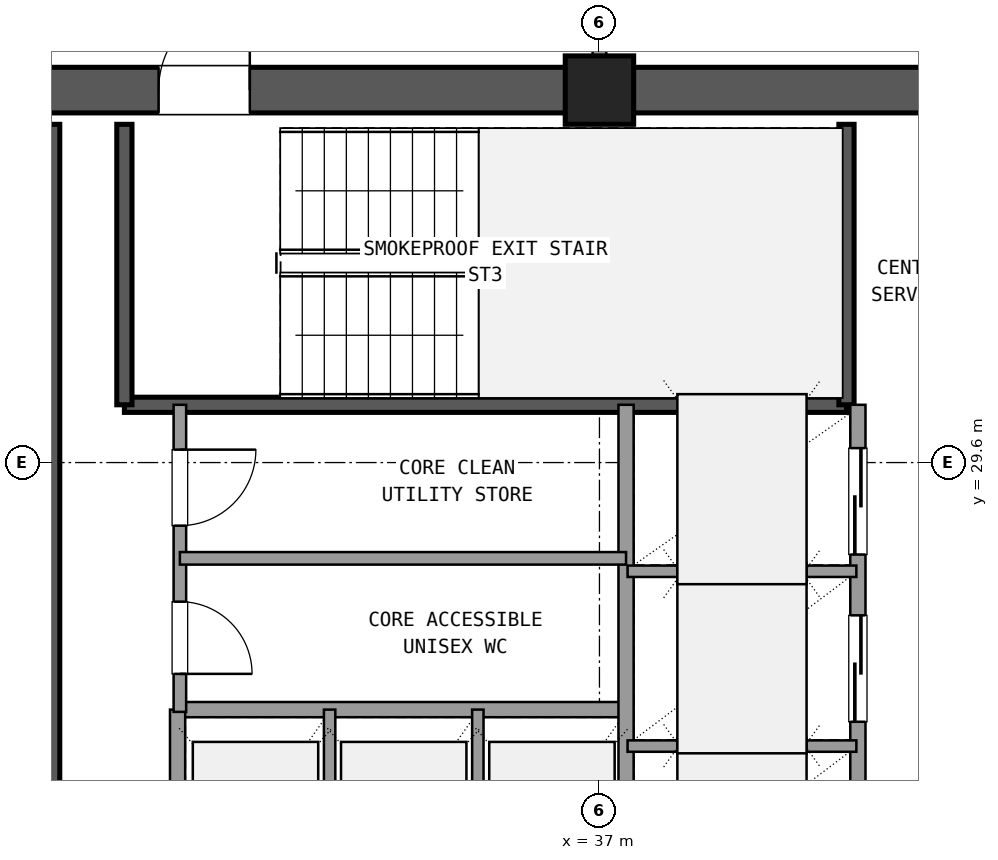
"""IFC4 building model, lengths in metres.
Left out: names, types, materials, properties, quantities, classifications, styles, units other than length and angle.
Written with IfcOpenShell. Run it as: python <this file> out.ifc"""

import sys

from ifc_helpers import new_model, si_unit, direction, frame, frame_2d, origin, origin_2d, place, context, subcontext, project, spatial, rectangle, extrude, element, fill, save


model = new_model("IFC4")
c1 = context("Model", 3, precision=1e-05, world=origin(), true_north=direction((0.0, 1.0)))
c2 = subcontext(c1, "Body", "Model", "MODEL_VIEW")
j1 = project(units=[si_unit("LENGTHUNIT", "METRE"), si_unit("PLANEANGLEUNIT", "RADIAN")], contexts=[c1])
p1 = place(None, origin())
s1 = spatial("IfcSite", under=j1, at=p1, CompositionType="ELEMENT")
p2 = place(p1, origin())
s2 = spatial("IfcBuilding", under=s1, at=p2, CompositionType="ELEMENT")
p3 = place(p2, frame((0.0, 0.0, 203.58)))
s3 = spatial("IfcBuildingStorey", under=s2, at=p3, CompositionType="ELEMENT", Elevation=203.58)
p4 = place(p3, frame((37.0, 34.5, 0.0), z_axis=(0.0, 0.0, 1.0), x_axis=(1.0, 0.0, 0.0)))
e1 = element("IfcColumn", 1, at=p4, inside=s3, PredefinedType="COLUMN", context=c2, shape_type="SweptSolid", body=[
    extrude(rectangle(XDim=0.9, YDim=0.9, at=origin_2d()), origin(), (0.0, 0.0, 1.0), 3.6),
])
p5 = place(p3, frame((47.755, 34.5, 0.0), z_axis=(0.0, 0.0, 1.0), x_axis=(-1.0, 0.0, 0.0)))
e2 = element("IfcWall", 2, at=p5, inside=s3, PredefinedType="SHEAR", context=c2, shape_type="SweptSolid", body=[
    extrude(rectangle(XDim=10.31, YDim=0.6, at=frame_2d((5.155, 0.0))), origin(), (0.0, 0.0, 1.0), 3.32),
])
p6 = place(p5, frame((4.655, 0.0, 0.0)))
e3 = element("IfcOpeningElement", 3, at=p6, cuts=e2, PredefinedType="OPENING", context=c2, shape_type="SweptSolid", body=[
    extrude(rectangle(XDim=1.6, YDim=2.2, at=frame_2d((0.8, 1.1))), frame((0.0, 0.31, 0.0), z_axis=(0.0, -1.0, 0.0), x_axis=(1.0, 0.0, 0.0)), (0.0, 0.0, 1.0), 0.62),
])
p7 = place(p3, frame((36.555, 34.5, 0.0), z_axis=(0.0, 0.0, 1.0), x_axis=(-1.0, 0.0, 0.0)))
e4 = element("IfcWall", 4, at=p7, inside=s3, PredefinedType="SHEAR", context=c2, shape_type="SweptSolid", body=[
    extrude(rectangle(XDim=10.31, YDim=0.6, at=frame_2d((5.155, 0.0))), origin(), (0.0, 0.0, 1.0), 3.32),
])
p8 = place(p7, frame((4.155, 0.0, 0.0)))
e5 = element("IfcOpeningElement", 5, at=p8, cuts=e4, PredefinedType="OPENING", context=c2, shape_type="SweptSolid", body=[
    extrude(rectangle(XDim=1.2, YDim=2.15, at=frame_2d((0.6, 1.075))), frame((0.0, 0.31, 0.0), z_axis=(0.0, -1.0, 0.0), x_axis=(1.0, 0.0, 0.0)), (0.0, 0.0, 1.0), 0.62),
])
p9 = place(p3, frame((29.8, 24.65, 0.0), z_axis=(0.0, 0.0, 1.0), x_axis=(0.0, 1.0, 0.0)))
e6 = element("IfcWall", 6, at=p9, inside=s3, PredefinedType="SHEAR", context=c2, shape_type="SweptSolid", body=[
    extrude(rectangle(XDim=9.4, YDim=0.2, at=frame_2d((4.7, 0.0))), origin(), (0.0, 0.0, 1.0), 3.32),
])
p10 = place(p3, frame((30.75, 30.36, 0.0), z_axis=(0.0, 0.0, 1.0), x_axis=(1.0, 0.0, 0.0)))
e7 = element("IfcWall", 7, at=p10, inside=s3, PredefinedType="SHEAR", context=c2, shape_type="SweptSolid", body=[
    extrude(rectangle(XDim=9.5, YDim=0.2, at=frame_2d((4.75, 0.0))), origin(), (0.0, 0.0, 1.0), 3.32),
])
for number, where, z_axis, x_axis in (
    (8, (30.75, 30.36, 0.0), (0.0, 0.0, 1.0), (0.0, 1.0, 0.0)),
    (9, (40.25, 30.36, 0.0), (0.0, 0.0, 1.0), (0.0, 1.0, 0.0)),
):
    element("IfcWall", number, at=place(p3, frame(where, z_axis=z_axis, x_axis=x_axis)), inside=s3, PredefinedType="SHEAR", context=c2, shape_type="SweptSolid", body=[
        extrude(rectangle(XDim=3.69, YDim=0.2, at=frame_2d((1.845, 0.0))), origin(), (0.0, 0.0, 1.0), 3.32),
    ])
p11 = place(p3, frame((31.45, 26.35, 0.0), z_axis=(0.0, 0.0, 1.0), x_axis=(1.0, 0.0, 0.0)))
e10 = element("IfcWall", 10, at=p11, inside=s3, PredefinedType="SOLIDWALL", context=c2, shape_type="SweptSolid", body=[
    extrude(rectangle(XDim=5.9, YDim=0.2, at=frame_2d((2.95, 0.0))), origin(), (0.0, 0.0, 1.0), 2.61),
])
p12 = place(p3, frame((31.45, 23.54, 0.0), z_axis=(0.0, 0.0, 1.0), x_axis=(0.0, 1.0, 0.0)))
e11 = element("IfcWall", 11, at=p12, inside=s3, PredefinedType="SOLIDWALL", context=c2, shape_type="SweptSolid", body=[
    extrude(rectangle(XDim=2.81, YDim=0.2, at=frame_2d((1.405, 0.0))), origin(), (0.0, 0.0, 1.0), 2.61),
])
for number, where, z_axis, x_axis in (
    (12, (33.45, 23.54, 0.0), (0.0, 0.0, 1.0), (0.0, 1.0, 0.0)),
    (13, (35.4, 23.54, 0.0), (0.0, 0.0, 1.0), (0.0, 1.0, 0.0)),
):
    element("IfcWall", number, at=place(p3, frame(where, z_axis=z_axis, x_axis=x_axis)), inside=s3, PredefinedType="PARTITIONING", context=c2, shape_type="SweptSolid", body=[
        extrude(rectangle(XDim=2.81, YDim=0.15, at=frame_2d((1.405, 0.0))), origin(), (0.0, 0.0, 1.0), 2.61),
    ])
p13 = place(p3, frame((37.35, 23.54, 0.0), z_axis=(0.0, 0.0, 1.0), x_axis=(0.0, 1.0, 0.0)))
e14 = element("IfcWall", 14, at=p13, inside=s3, PredefinedType="SOLIDWALL", context=c2, shape_type="SweptSolid", body=[
    extrude(rectangle(XDim=6.82, YDim=0.2, at=frame_2d((3.41, 0.0))), origin(), (0.0, 0.0, 1.0), 2.61),
])
p14 = place(p3, frame((40.4, 23.54, 0.0), z_axis=(0.0, 0.0, 1.0), x_axis=(0.0, 1.0, 0.0)))
e15 = element("IfcWall", 15, at=p14, inside=s3, PredefinedType="SOLIDWALL", context=c2, shape_type="SweptSolid", body=[
    extrude(rectangle(XDim=6.82, YDim=0.2, at=frame_2d((3.41, 0.0))), origin(), (0.0, 0.0, 1.0), 2.61),
])
p15 = place(p14, frame((0.35, 0.0, 0.0)))
e16 = element("IfcOpeningElement", 16, at=p15, cuts=e15, PredefinedType="OPENING", context=c2, shape_type="SweptSolid", body=[
    extrude(rectangle(XDim=1.4, YDim=2.2, at=frame_2d((0.7, 1.1))), frame((0.0, 0.11, 0.0), z_axis=(0.0, -1.0, 0.0), x_axis=(1.0, 0.0, 0.0)), (0.0, 0.0, 1.0), 0.22),
])
p16 = place(p14, frame((2.65, 0.0, 0.0)))
e17 = element("IfcOpeningElement", 17, at=p16, cuts=e15, PredefinedType="OPENING", context=c2, shape_type="SweptSolid", body=[
    extrude(rectangle(XDim=1.4, YDim=2.2, at=frame_2d((0.7, 1.1))), frame((0.0, 0.11, 0.0), z_axis=(0.0, -1.0, 0.0), x_axis=(1.0, 0.0, 0.0)), (0.0, 0.0, 1.0), 0.22),
])
p17 = place(p14, frame((4.85, 0.0, 0.0)))
e18 = element("IfcOpeningElement", 18, at=p17, cuts=e15, PredefinedType="OPENING", context=c2, shape_type="SweptSolid", body=[
    extrude(rectangle(XDim=1.4, YDim=2.2, at=frame_2d((0.7, 1.1))), frame((0.0, 0.11, 0.0), z_axis=(0.0, -1.0, 0.0), x_axis=(1.0, 0.0, 0.0)), (0.0, 0.0, 1.0), 0.22),
])
for number, where, z_axis, x_axis in (
    (19, (37.37, 25.87, 0.0), (0.0, 0.0, 1.0), (1.0, 0.0, 0.0)),
    (20, (37.37, 28.17, 0.0), (0.0, 0.0, 1.0), (1.0, 0.0, 0.0)),
):
    element("IfcWall", number, at=place(p3, frame(where, z_axis=z_axis, x_axis=x_axis)), inside=s3, PredefinedType="PARTITIONING", context=c2, shape_type="SweptSolid", body=[
        extrude(rectangle(XDim=3.01, YDim=0.15, at=frame_2d((1.505, 0.0))), origin(), (0.0, 0.0, 1.0), 2.61),
    ])
p18 = place(p3, frame((31.48, 26.32, 0.0), z_axis=(0.0, 0.0, 1.0), x_axis=(0.0, 1.0, 0.0)))
e21 = element("IfcWall", 21, at=p18, inside=s3, PredefinedType="PLUMBINGWALL", context=c2, shape_type="SweptSolid", body=[
    extrude(rectangle(XDim=4.04, YDim=0.165, at=frame_2d((2.02, 0.0))), origin(), (0.0, 0.0, 1.0), 2.61),
])
p19 = place(p18, frame((0.5, 0.0, 0.0)))
e22 = element("IfcOpeningElement", 22, at=p19, cuts=e21, PredefinedType="OPENING", context=c2, shape_type="SweptSolid", body=[
    extrude(rectangle(XDim=0.95, YDim=2.1, at=frame_2d((0.475, 1.05))), frame((0.0, 0.093, 0.0), z_axis=(0.0, -1.0, 0.0), x_axis=(1.0, 0.0, 0.0)), (0.0, 0.0, 1.0), 0.185),
])
p20 = place(p18, frame((2.45, 0.0, 0.0)))
e23 = element("IfcOpeningElement", 23, at=p20, cuts=e21, PredefinedType="OPENING", context=c2, shape_type="SweptSolid", body=[
    extrude(rectangle(XDim=1.0, YDim=2.15, at=frame_2d((0.5, 1.075))), frame((0.0, 0.093, 0.0), z_axis=(0.0, -1.0, 0.0), x_axis=(1.0, 0.0, 0.0)), (0.0, 0.0, 1.0), 0.185),
])
p21 = place(p3, frame((31.48, 28.34, 0.0), z_axis=(0.0, 0.0, 1.0), x_axis=(1.0, 0.0, 0.0)))
e24 = element("IfcWall", 24, at=p21, inside=s3, PredefinedType="PLUMBINGWALL", context=c2, shape_type="SweptSolid", body=[
    extrude(rectangle(XDim=5.87, YDim=0.165, at=frame_2d((2.935, 0.0))), origin(), (0.0, 0.0, 1.0), 2.61),
])
p22 = place(p3, frame((37.0, 34.95, 0.0), z_axis=(0.0, 0.0, 1.0), x_axis=(0.0, 1.0, 0.0)))
e25 = element("IfcWall", 25, at=p22, inside=s3, PredefinedType="PARTITIONING", context=c2, shape_type="SweptSolid", body=[
    extrude(rectangle(XDim=2.7, YDim=0.18, at=frame_2d((1.35, 0.0))), origin(), (0.0, 0.0, 1.0), 2.61),
])
p23 = place(p22, frame((0.35, 0.0, 0.0)))
e26 = element("IfcOpeningElement", 26, at=p23, cuts=e25, PredefinedType="OPENING", context=c2, shape_type="SweptSolid", body=[
    extrude(rectangle(XDim=2.0, YDim=2.2, at=frame_2d((1.0, 1.1))), frame((0.0, 0.1, 0.0), z_axis=(0.0, -1.0, 0.0), x_axis=(1.0, 0.0, 0.0)), (0.0, 0.0, 1.0), 0.2),
])
p24 = place(p8, frame((1.2, 0.0, 0.0), z_axis=(0.0, 0.0, 1.0), x_axis=(-1.0, 0.0, 0.0)))
e27 = element("IfcDoor", 27, at=p24, inside=s3, OperationType="SINGLE_SWING_LEFT", PredefinedType="DOOR", context=c2, shape_type="SweptSolid", body=[
    extrude(rectangle(XDim=1.2, YDim=2.15, at=frame_2d((0.6, 1.075))), frame((0.0, 0.025, 0.0), z_axis=(0.0, -1.0, 0.0), x_axis=(1.0, 0.0, 0.0)), (0.0, 0.0, 1.0), 0.05),
])
fill(e5, e27)
p25 = place(p16, origin())
e28 = element("IfcDoor", 28, at=p25, inside=s3, OperationType="SLIDING_TO_LEFT", PredefinedType="DOOR", context=c2, shape_type="SweptSolid", body=[
    extrude(rectangle(XDim=1.4, YDim=2.2, at=frame_2d((0.7, 1.1))), frame((0.0, 0.025, 0.0), z_axis=(0.0, -1.0, 0.0), x_axis=(1.0, 0.0, 0.0)), (0.0, 0.0, 1.0), 0.05),
])
fill(e17, e28)
p26 = place(p17, origin())
e29 = element("IfcDoor", 29, at=p26, inside=s3, OperationType="SLIDING_TO_RIGHT", PredefinedType="DOOR", context=c2, shape_type="SweptSolid", body=[
    extrude(rectangle(XDim=1.4, YDim=2.2, at=frame_2d((0.7, 1.1))), frame((0.0, 0.025, 0.0), z_axis=(0.0, -1.0, 0.0), x_axis=(1.0, 0.0, 0.0)), (0.0, 0.0, 1.0), 0.05),
])
fill(e18, e29)
p27 = place(p19, frame((0.95, 0.0, 0.0), z_axis=(0.0, 0.0, 1.0), x_axis=(-1.0, 0.0, 0.0)))
e30 = element("IfcDoor", 30, at=p27, inside=s3, OperationType="SINGLE_SWING_LEFT", PredefinedType="DOOR", context=c2, shape_type="SweptSolid", body=[
    extrude(rectangle(XDim=0.95, YDim=2.1, at=frame_2d((0.475, 1.05))), frame((0.0, 0.025, 0.0), z_axis=(0.0, -1.0, 0.0), x_axis=(1.0, 0.0, 0.0)), (0.0, 0.0, 1.0), 0.05),
])
fill(e22, e30)
p28 = place(p20, frame((1.0, 0.0, 0.0), z_axis=(0.0, 0.0, 1.0), x_axis=(-1.0, 0.0, 0.0)))
e31 = element("IfcDoor", 31, at=p28, inside=s3, OperationType="SINGLE_SWING_RIGHT", PredefinedType="DOOR", context=c2, shape_type="SweptSolid", body=[
    extrude(rectangle(XDim=1.0, YDim=2.15, at=frame_2d((0.5, 1.075))), frame((0.0, 0.025, 0.0), z_axis=(0.0, -1.0, 0.0), x_axis=(1.0, 0.0, 0.0)), (0.0, 0.0, 1.0), 0.05),
])
fill(e23, e31)
save(model, sys.argv[1])
